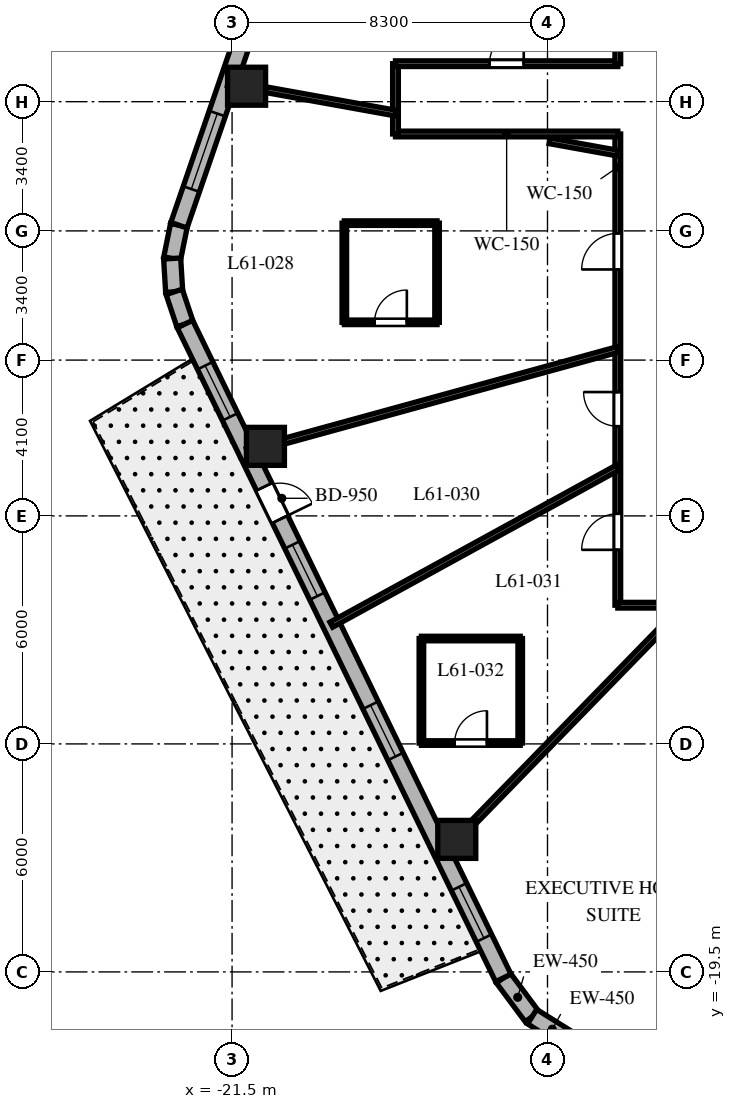
"""IFC4 building model, lengths in metres.
Left out: names, types, materials, properties, quantities, classifications, styles, units other than length and angle.
Written with IfcOpenShell. Run it as: python <this file> out.ifc"""

import sys

from ifc_helpers import new_model, si_unit, direction, frame, frame_2d, origin, origin_2d, place, context, subcontext, project, spatial, rectangle, extrude, element, fill, save


model = new_model("IFC4")
c1 = context("Model", 3, precision=1e-05, world=origin(), true_north=direction((0.0, 1.0)))
c2 = subcontext(c1, "Body", "Model", "MODEL_VIEW")
j1 = project(units=[si_unit("LENGTHUNIT", "METRE"), si_unit("PLANEANGLEUNIT", "RADIAN")], contexts=[c1])
p1 = place(None, origin())
s1 = spatial("IfcSite", under=j1, at=p1, CompositionType="ELEMENT")
p2 = place(p1, origin())
s2 = spatial("IfcBuilding", under=s1, at=p2, CompositionType="ELEMENT")
p3 = place(p2, frame((0.0, 0.0, 244.5)))
s3 = spatial("IfcBuildingStorey", under=s2, at=p3, CompositionType="ELEMENT", Elevation=244.5)
for number, where, z_axis, x_axis in (
    (1, (-21.118, 3.807, 0.0), (0.0, 0.0, 1.0), (1.0, 0.0, 0.0)),
    (2, (-20.622, -5.67, 0.0), (0.0, 0.0, 1.0), (1.0, 0.0, 0.0)),
    (3, (-15.587, -16.013, 0.0), (0.0, 0.0, 1.0), (1.0, 0.0, 0.0)),
):
    element("IfcColumn", number, at=place(p3, frame(where, z_axis=z_axis, x_axis=x_axis)), inside=s3, PredefinedType="COLUMN", context=c2, shape_type="SweptSolid", body=[
        extrude(rectangle(XDim=1.0, YDim=1.0, at=origin_2d()), origin(), (0.0, 0.0, 1.0), 3.8),
    ])
p4 = place(p3, frame((-14.362, -19.658, 0.0), z_axis=(0.0, 0.0, 1.0), x_axis=(0.596642462792, -0.80250717853, 0.0)))
e4 = element("IfcWall", 4, at=p4, inside=s3, PredefinedType="SOLIDWALL", context=c2, shape_type="SweptSolid", body=[
    extrude(rectangle(XDim=1.27, YDim=0.45, at=frame_2d((0.635, 0.0))), origin(), (0.0, 0.0, 1.0), 3.5),
])
p5 = place(p3, frame((-13.604, -20.678, 0.0), z_axis=(0.0, 0.0, 1.0), x_axis=(0.847910404124, -0.53013955387, 0.0)))
e5 = element("IfcWall", 5, at=p5, inside=s3, PredefinedType="SOLIDWALL", context=c2, shape_type="SweptSolid", body=[
    extrude(rectangle(XDim=1.249, YDim=0.45, at=frame_2d((0.624, 0.0))), origin(), (0.0, 0.0, 1.0), 3.5),
])
p6 = place(p3, frame((-22.898, 0.15, 0.0), z_axis=(0.0, 0.0, 1.0), x_axis=(-0.199055826889, -0.979988151858, 0.0)))
e6 = element("IfcWall", 6, at=p6, inside=s3, PredefinedType="SOLIDWALL", context=c2, shape_type="SweptSolid", body=[
    extrude(rectangle(XDim=0.894, YDim=0.45, at=frame_2d((0.447, 0.0))), origin(), (0.0, 0.0, 1.0), 3.5),
])
p7 = place(p3, frame((-23.076, -0.727, 0.0), z_axis=(0.0, 0.0, 1.0), x_axis=(0.060805222108, -0.998149650586, 0.0)))
e7 = element("IfcWall", 7, at=p7, inside=s3, PredefinedType="SOLIDWALL", context=c2, shape_type="SweptSolid", body=[
    extrude(rectangle(XDim=0.879, YDim=0.45, at=frame_2d((0.44, 0.0))), origin(), (0.0, 0.0, 1.0), 3.5),
])
p8 = place(p3, frame((-23.023, -1.604, 0.0), z_axis=(0.0, 0.0, 1.0), x_axis=(0.316801227695, -0.948491951537, 0.0)))
e8 = element("IfcWall", 8, at=p8, inside=s3, PredefinedType="SOLIDWALL", context=c2, shape_type="SweptSolid", body=[
    extrude(rectangle(XDim=0.894, YDim=0.45, at=frame_2d((0.447, 0.0))), origin(), (0.0, 0.0, 1.0), 3.5),
])
p9 = place(p3, frame((-16.324, 19.275, 0.0), z_axis=(0.0, 0.0, 1.0), x_axis=(-0.325083142304, -0.945685439557, 0.0)))
e9 = element("IfcWall", 9, at=p9, inside=s3, PredefinedType="SOLIDWALL", context=c2, shape_type="SweptSolid", body=[
    extrude(rectangle(XDim=20.224, YDim=0.45, at=frame_2d((10.112, 0.0))), origin(), (0.0, 0.0, 1.0), 3.5),
])
p10 = place(p9, frame((0.953, 0.0, 0.8)))
e10 = element("IfcOpeningElement", 10, at=p10, cuts=e9, PredefinedType="OPENING", context=c2, shape_type="SweptSolid", body=[
    extrude(rectangle(XDim=2.1, YDim=1.85, at=frame_2d((1.05, 0.925))), frame((0.0, 0.235, 0.0), z_axis=(0.0, -1.0, 0.0), x_axis=(1.0, 0.0, 0.0)), (0.0, 0.0, 1.0), 0.47),
])
p11 = place(p9, frame((6.268, 0.0, 0.8)))
e11 = element("IfcOpeningElement", 11, at=p11, cuts=e9, PredefinedType="OPENING", context=c2, shape_type="SweptSolid", body=[
    extrude(rectangle(XDim=2.1, YDim=1.85, at=frame_2d((1.05, 0.925))), frame((0.0, 0.235, 0.0), z_axis=(0.0, -1.0, 0.0), x_axis=(1.0, 0.0, 0.0)), (0.0, 0.0, 1.0), 0.47),
])
p12 = place(p9, frame((11.95, 0.0, 0.8)))
e12 = element("IfcOpeningElement", 12, at=p12, cuts=e9, PredefinedType="OPENING", context=c2, shape_type="SweptSolid", body=[
    extrude(rectangle(XDim=2.1, YDim=1.85, at=frame_2d((1.05, 0.925))), frame((0.0, 0.235, 0.0), z_axis=(0.0, -1.0, 0.0), x_axis=(1.0, 0.0, 0.0)), (0.0, 0.0, 1.0), 0.47),
])
p13 = place(p9, frame((17.118, 0.0, 0.8)))
e13 = element("IfcOpeningElement", 13, at=p13, cuts=e9, PredefinedType="OPENING", context=c2, shape_type="SweptSolid", body=[
    extrude(rectangle(XDim=2.1, YDim=1.85, at=frame_2d((1.05, 0.925))), frame((0.0, 0.235, 0.0), z_axis=(0.0, -1.0, 0.0), x_axis=(1.0, 0.0, 0.0)), (0.0, 0.0, 1.0), 0.47),
])
p14 = place(p3, frame((-22.74, -2.452, 0.0), z_axis=(0.0, 0.0, 1.0), x_axis=(0.437753424814, -0.899095066755, 0.0)))
e14 = element("IfcWall", 14, at=p14, inside=s3, PredefinedType="SOLIDWALL", context=c2, shape_type="SweptSolid", body=[
    extrude(rectangle(XDim=19.137, YDim=0.45, at=frame_2d((9.569, 0.0))), origin(), (0.0, 0.0, 1.0), 3.5),
])
p15 = place(p14, frame((4.763, 0.0, 0.0)))
e15 = element("IfcOpeningElement", 15, at=p15, cuts=e14, PredefinedType="OPENING", context=c2, shape_type="SweptSolid", body=[
    extrude(rectangle(XDim=0.95, YDim=2.15, at=frame_2d((0.475, 1.075))), frame((0.0, 0.235, 0.0), z_axis=(0.0, -1.0, 0.0), x_axis=(1.0, 0.0, 0.0)), (0.0, 0.0, 1.0), 0.47),
])
p16 = place(p14, frame((1.216, 0.0, 0.8)))
e16 = element("IfcOpeningElement", 16, at=p16, cuts=e14, PredefinedType="OPENING", context=c2, shape_type="SweptSolid", body=[
    extrude(rectangle(XDim=1.5, YDim=1.8, at=frame_2d((0.75, 0.9))), frame((0.0, 0.235, 0.0), z_axis=(0.0, -1.0, 0.0), x_axis=(1.0, 0.0, 0.0)), (0.0, 0.0, 1.0), 0.47),
])
p17 = place(p14, frame((6.461, 0.0, 0.8)))
e17 = element("IfcOpeningElement", 17, at=p17, cuts=e14, PredefinedType="OPENING", context=c2, shape_type="SweptSolid", body=[
    extrude(rectangle(XDim=1.5, YDim=1.8, at=frame_2d((0.75, 0.9))), frame((0.0, 0.235, 0.0), z_axis=(0.0, -1.0, 0.0), x_axis=(1.0, 0.0, 0.0)), (0.0, 0.0, 1.0), 0.47),
])
p18 = place(p14, frame((11.156, 0.0, 0.8)))
e18 = element("IfcOpeningElement", 18, at=p18, cuts=e14, PredefinedType="OPENING", context=c2, shape_type="SweptSolid", body=[
    extrude(rectangle(XDim=1.5, YDim=1.8, at=frame_2d((0.75, 0.9))), frame((0.0, 0.235, 0.0), z_axis=(0.0, -1.0, 0.0), x_axis=(1.0, 0.0, 0.0)), (0.0, 0.0, 1.0), 0.47),
])
p19 = place(p14, frame((16.473, 0.0, 0.8)))
e19 = element("IfcOpeningElement", 19, at=p19, cuts=e14, PredefinedType="OPENING", context=c2, shape_type="SweptSolid", body=[
    extrude(rectangle(XDim=1.5, YDim=1.8, at=frame_2d((0.75, 0.9))), frame((0.0, 0.235, 0.0), z_axis=(0.0, -1.0, 0.0), x_axis=(1.0, 0.0, 0.0)), (0.0, 0.0, 1.0), 0.47),
])
p20 = place(p3, frame((-11.35, -9.85, 0.0), z_axis=(0.0, 0.0, 1.0), x_axis=(0.0, 1.0, 0.0)))
e20 = element("IfcWall", 20, at=p20, inside=s3, PredefinedType="PARTITIONING", context=c2, shape_type="SweptSolid", body=[
    extrude(rectangle(XDim=12.4, YDim=0.15, at=frame_2d((6.2, 0.0))), origin(), (0.0, 0.0, 1.0), 2.99),
])
p21 = place(p20, frame((8.835, 0.0, 0.0)))
e21 = element("IfcOpeningElement", 21, at=p21, cuts=e20, PredefinedType="OPENING", context=c2, shape_type="SweptSolid", body=[
    extrude(rectangle(XDim=0.95, YDim=2.03, at=frame_2d((0.475, 1.015))), frame((0.0, 0.085, 0.0), z_axis=(0.0, -1.0, 0.0), x_axis=(1.0, 0.0, 0.0)), (0.0, 0.0, 1.0), 0.17),
])
p22 = place(p20, frame((4.709, 0.0, 0.0)))
e22 = element("IfcOpeningElement", 22, at=p22, cuts=e20, PredefinedType="OPENING", context=c2, shape_type="SweptSolid", body=[
    extrude(rectangle(XDim=0.9, YDim=2.03, at=frame_2d((0.45, 1.015))), frame((0.0, 0.085, 0.0), z_axis=(0.0, -1.0, 0.0), x_axis=(1.0, 0.0, 0.0)), (0.0, 0.0, 1.0), 0.17),
])
p23 = place(p20, frame((1.457, 0.0, 0.0)))
e23 = element("IfcOpeningElement", 23, at=p23, cuts=e20, PredefinedType="OPENING", context=c2, shape_type="SweptSolid", body=[
    extrude(rectangle(XDim=0.95, YDim=2.03, at=frame_2d((0.475, 1.015))), frame((0.0, 0.085, 0.0), z_axis=(0.0, -1.0, 0.0), x_axis=(1.0, 0.0, 0.0)), (0.0, 0.0, 1.0), 0.17),
])
p24 = place(p3, frame((-11.35, 2.55, 0.0), z_axis=(0.0, 0.0, 1.0), x_axis=(-1.0, 0.0, 0.0)))
e24 = element("IfcWall", 24, at=p24, inside=s3, PredefinedType="PARTITIONING", context=c2, shape_type="SweptSolid", body=[
    extrude(rectangle(XDim=5.85, YDim=0.15, at=frame_2d((2.925, 0.0))), origin(), (0.0, 0.0, 1.0), 2.94),
])
p25 = place(p3, frame((-17.2, 2.55, 0.0), z_axis=(0.0, 0.0, 1.0), x_axis=(0.0, 1.0, 0.0)))
e25 = element("IfcWall", 25, at=p25, inside=s3, PredefinedType="PARTITIONING", context=c2, shape_type="SweptSolid", body=[
    extrude(rectangle(XDim=1.85, YDim=0.15, at=frame_2d((0.925, 0.0))), origin(), (0.0, 0.0, 1.0), 2.94),
])
p26 = place(p3, frame((-17.2, 4.4, 0.0), z_axis=(0.0, 0.0, 1.0), x_axis=(1.0, 0.0, 0.0)))
e26 = element("IfcWall", 26, at=p26, inside=s3, PredefinedType="PARTITIONING", context=c2, shape_type="SweptSolid", body=[
    extrude(rectangle(XDim=5.85, YDim=0.15, at=frame_2d((2.925, 0.0))), origin(), (0.0, 0.0, 1.0), 2.94),
])
p27 = place(p26, frame((2.475, 0.0, 0.0)))
e27 = element("IfcOpeningElement", 27, at=p27, cuts=e26, PredefinedType="OPENING", context=c2, shape_type="SweptSolid", body=[
    extrude(rectangle(XDim=0.9, YDim=2.03, at=frame_2d((0.45, 1.015))), frame((0.0, 0.085, 0.0), z_axis=(0.0, -1.0, 0.0), x_axis=(1.0, 0.0, 0.0)), (0.0, 0.0, 1.0), 0.17),
])
p28 = place(p3, frame((-11.35, 4.4, 0.0), z_axis=(0.0, 0.0, 1.0), x_axis=(0.0, 1.0, 0.0)))
e28 = element("IfcWall", 28, at=p28, inside=s3, PredefinedType="PARTITIONING", context=c2, shape_type="SweptSolid", body=[
    extrude(rectangle(XDim=5.45, YDim=0.15, at=frame_2d((2.725, 0.0))), origin(), (0.0, 0.0, 1.0), 2.99),
])
p29 = place(p28, frame((2.694, 0.0, 0.0)))
e29 = element("IfcOpeningElement", 29, at=p29, cuts=e28, PredefinedType="OPENING", context=c2, shape_type="SweptSolid", body=[
    extrude(rectangle(XDim=0.95, YDim=2.03, at=frame_2d((0.475, 1.015))), frame((0.0, 0.085, 0.0), z_axis=(0.0, -1.0, 0.0), x_axis=(1.0, 0.0, 0.0)), (0.0, 0.0, 1.0), 0.17),
])
p30 = place(p3, frame((-0.92, -9.85, 0.0), z_axis=(0.0, 0.0, 1.0), x_axis=(-1.0, 0.0, 0.0)))
e30 = element("IfcWall", 30, at=p30, inside=s3, PredefinedType="PARTITIONING", context=c2, shape_type="SweptSolid", body=[
    extrude(rectangle(XDim=10.43, YDim=0.15, at=frame_2d((5.215, 0.0))), origin(), (0.0, 0.0, 1.0), 2.99),
])
p31 = place(p30, frame((4.949, 0.0, 0.0)))
e31 = element("IfcOpeningElement", 31, at=p31, cuts=e30, PredefinedType="OPENING", context=c2, shape_type="SweptSolid", body=[
    extrude(rectangle(XDim=0.95, YDim=2.03, at=frame_2d((0.475, 1.015))), frame((0.0, 0.085, 0.0), z_axis=(0.0, -1.0, 0.0), x_axis=(1.0, 0.0, 0.0)), (0.0, 0.0, 1.0), 0.17),
])
p32 = place(p3, frame((-11.35, 2.046, 0.0), z_axis=(0.0, 0.0, 1.0), x_axis=(-0.984127783205, 0.177461281195, 0.0)))
e32 = element("IfcWall", 32, at=p32, inside=s3, PredefinedType="PARTITIONING", context=c2, shape_type="SweptSolid", body=[
    extrude(rectangle(XDim=1.826, YDim=0.15, at=frame_2d((0.913, 0.0))), origin(), (0.0, 0.0, 1.0), 3.5),
])
p33 = place(p3, frame((-17.2, 3.101, 0.0), z_axis=(0.0, 0.0, 1.0), x_axis=(-0.98413465883, 0.177423147559, 0.0)))
e33 = element("IfcWall", 33, at=p33, inside=s3, PredefinedType="PARTITIONING", context=c2, shape_type="SweptSolid", body=[
    extrude(rectangle(XDim=4.482, YDim=0.15, at=frame_2d((2.241, 0.0))), origin(), (0.0, 0.0, 1.0), 2.74),
])
p34 = place(p3, frame((-11.35, -3.121, 0.0), z_axis=(0.0, 0.0, 1.0), x_axis=(-0.964212793822, -0.265129568758, 0.0)))
e34 = element("IfcWall", 34, at=p34, inside=s3, PredefinedType="PARTITIONING", context=c2, shape_type="SweptSolid", body=[
    extrude(rectangle(XDim=10.12, YDim=0.15, at=frame_2d((5.06, 0.0))), origin(), (0.0, 0.0, 1.0), 2.74),
])
p35 = place(p3, frame((-11.35, -6.227, 0.0), z_axis=(0.0, 0.0, 1.0), x_axis=(-0.876723190824, -0.480995266786, 0.0)))
e35 = element("IfcWall", 35, at=p35, inside=s3, PredefinedType="PARTITIONING", context=c2, shape_type="SweptSolid", body=[
    extrude(rectangle(XDim=8.598, YDim=0.15, at=frame_2d((4.299, 0.0))), origin(), (0.0, 0.0, 1.0), 2.74),
])
p36 = place(p3, frame((-9.588, -9.85, 0.0), z_axis=(0.0, 0.0, 1.0), x_axis=(-0.697519469595, -0.716565830567, 0.0)))
e36 = element("IfcWall", 36, at=p36, inside=s3, PredefinedType="PARTITIONING", context=c2, shape_type="SweptSolid", body=[
    extrude(rectangle(XDim=9.126, YDim=0.15, at=frame_2d((4.563, 0.0))), origin(), (0.0, 0.0, 1.0), 2.74),
])
p37 = place(p3, frame((-18.546, -2.406, 0.0), z_axis=(0.0, 0.0, 1.0), x_axis=(1.0, 0.0, 0.0)))
e37 = element("IfcWall", 37, at=p37, inside=s3, PredefinedType="PARTITIONING", context=c2, shape_type="SweptSolid", body=[
    extrude(rectangle(XDim=2.44, YDim=0.12, at=frame_2d((1.22, 0.0))), origin(), (0.0, 0.0, 1.0), 2.94),
])
p38 = place(p37, frame((0.795, 0.0, 0.0)))
e38 = element("IfcOpeningElement", 38, at=p38, cuts=e37, PredefinedType="OPENING", context=c2, shape_type="SweptSolid", body=[
    extrude(rectangle(XDim=0.85, YDim=2.03, at=frame_2d((0.425, 1.015))), frame((0.0, 0.07, 0.0), z_axis=(0.0, -1.0, 0.0), x_axis=(1.0, 0.0, 0.0)), (0.0, 0.0, 1.0), 0.14),
])
p39 = place(p3, frame((-16.106, -2.406, 0.0), z_axis=(0.0, 0.0, 1.0), x_axis=(0.0, 1.0, 0.0)))
e39 = element("IfcWall", 39, at=p39, inside=s3, PredefinedType="PARTITIONING", context=c2, shape_type="SweptSolid", body=[
    extrude(rectangle(XDim=2.61, YDim=0.12, at=frame_2d((1.305, 0.0))), origin(), (0.0, 0.0, 1.0), 3.5),
])
p40 = place(p3, frame((-16.106, 0.204, 0.0), z_axis=(0.0, 0.0, 1.0), x_axis=(-1.0, 0.0, 0.0)))
e40 = element("IfcWall", 40, at=p40, inside=s3, PredefinedType="PARTITIONING", context=c2, shape_type="SweptSolid", body=[
    extrude(rectangle(XDim=2.44, YDim=0.12, at=frame_2d((1.22, 0.0))), origin(), (0.0, 0.0, 1.0), 2.94),
])
p41 = place(p3, frame((-18.546, 0.204, 0.0), z_axis=(0.0, 0.0, 1.0), x_axis=(0.0, -1.0, 0.0)))
e41 = element("IfcWall", 41, at=p41, inside=s3, PredefinedType="PARTITIONING", context=c2, shape_type="SweptSolid", body=[
    extrude(rectangle(XDim=2.61, YDim=0.12, at=frame_2d((1.305, 0.0))), origin(), (0.0, 0.0, 1.0), 3.5),
])
p42 = place(p3, frame((-16.518, -13.477, 0.0), z_axis=(0.0, 0.0, 1.0), x_axis=(1.0, 0.0, 0.0)))
e42 = element("IfcWall", 42, at=p42, inside=s3, PredefinedType="PARTITIONING", context=c2, shape_type="SweptSolid", body=[
    extrude(rectangle(XDim=2.6, YDim=0.12, at=frame_2d((1.3, 0.0))), origin(), (0.0, 0.0, 1.0), 3.5),
])
p43 = place(p42, frame((0.875, 0.0, 0.0)))
e43 = element("IfcOpeningElement", 43, at=p43, cuts=e42, PredefinedType="OPENING", context=c2, shape_type="SweptSolid", body=[
    extrude(rectangle(XDim=0.85, YDim=2.03, at=frame_2d((0.425, 1.015))), frame((0.0, 0.07, 0.0), z_axis=(0.0, -1.0, 0.0), x_axis=(1.0, 0.0, 0.0)), (0.0, 0.0, 1.0), 0.14),
])
p44 = place(p3, frame((-13.918, -13.477, 0.0), z_axis=(0.0, 0.0, 1.0), x_axis=(0.0, 1.0, 0.0)))
e44 = element("IfcWall", 44, at=p44, inside=s3, PredefinedType="PARTITIONING", context=c2, shape_type="SweptSolid", body=[
    extrude(rectangle(XDim=2.75, YDim=0.12, at=frame_2d((1.375, 0.0))), origin(), (0.0, 0.0, 1.0), 3.027),
])
p45 = place(p3, frame((-13.918, -10.727, 0.0), z_axis=(0.0, 0.0, 1.0), x_axis=(-1.0, 0.0, 0.0)))
e45 = element("IfcWall", 45, at=p45, inside=s3, PredefinedType="PARTITIONING", context=c2, shape_type="SweptSolid", body=[
    extrude(rectangle(XDim=2.6, YDim=0.12, at=frame_2d((1.3, 0.0))), origin(), (0.0, 0.0, 1.0), 3.027),
])
p46 = place(p3, frame((-16.518, -10.727, 0.0), z_axis=(0.0, 0.0, 1.0), x_axis=(0.0, -1.0, 0.0)))
e46 = element("IfcWall", 46, at=p46, inside=s3, PredefinedType="PARTITIONING", context=c2, shape_type="SweptSolid", body=[
    extrude(rectangle(XDim=2.75, YDim=0.12, at=frame_2d((1.375, 0.0))), origin(), (0.0, 0.0, 1.0), 3.5),
])
p47 = place(p13, origin())
e47 = element("IfcWindow", 47, at=p47, inside=s3, PartitioningType="SINGLE_PANEL", PredefinedType="WINDOW", context=c2, shape_type="SweptSolid", body=[
    extrude(rectangle(XDim=2.1, YDim=1.85, at=frame_2d((1.05, 0.925))), frame((0.0, 0.03, 0.0), z_axis=(0.0, -1.0, 0.0), x_axis=(1.0, 0.0, 0.0)), (0.0, 0.0, 1.0), 0.06),
])
fill(e13, e47)
p48 = place(p15, origin())
e48 = element("IfcDoor", 48, at=p48, inside=s3, OperationType="SINGLE_SWING_RIGHT", PredefinedType="DOOR", context=c2, shape_type="SweptSolid", body=[
    extrude(rectangle(XDim=0.95, YDim=2.15, at=frame_2d((0.475, 1.075))), frame((0.0, 0.025, 0.0), z_axis=(0.0, -1.0, 0.0), x_axis=(1.0, 0.0, 0.0)), (0.0, 0.0, 1.0), 0.05),
])
fill(e15, e48)
p49 = place(p16, origin())
e49 = element("IfcWindow", 49, at=p49, inside=s3, PartitioningType="SINGLE_PANEL", PredefinedType="WINDOW", context=c2, shape_type="SweptSolid", body=[
    extrude(rectangle(XDim=1.5, YDim=1.8, at=frame_2d((0.75, 0.9))), frame((0.0, 0.03, 0.0), z_axis=(0.0, -1.0, 0.0), x_axis=(1.0, 0.0, 0.0)), (0.0, 0.0, 1.0), 0.06),
])
fill(e16, e49)
p50 = place(p17, origin())
e50 = element("IfcWindow", 50, at=p50, inside=s3, PartitioningType="SINGLE_PANEL", PredefinedType="WINDOW", context=c2, shape_type="SweptSolid", body=[
    extrude(rectangle(XDim=1.5, YDim=1.8, at=frame_2d((0.75, 0.9))), frame((0.0, 0.03, 0.0), z_axis=(0.0, -1.0, 0.0), x_axis=(1.0, 0.0, 0.0)), (0.0, 0.0, 1.0), 0.06),
])
fill(e17, e50)
p51 = place(p18, origin())
e51 = element("IfcWindow", 51, at=p51, inside=s3, PartitioningType="SINGLE_PANEL", PredefinedType="WINDOW", context=c2, shape_type="SweptSolid", body=[
    extrude(rectangle(XDim=1.5, YDim=1.8, at=frame_2d((0.75, 0.9))), frame((0.0, 0.03, 0.0), z_axis=(0.0, -1.0, 0.0), x_axis=(1.0, 0.0, 0.0)), (0.0, 0.0, 1.0), 0.06),
])
fill(e18, e51)
p52 = place(p19, origin())
e52 = element("IfcWindow", 52, at=p52, inside=s3, PartitioningType="SINGLE_PANEL", PredefinedType="WINDOW", context=c2, shape_type="SweptSolid", body=[
    extrude(rectangle(XDim=1.5, YDim=1.8, at=frame_2d((0.75, 0.9))), frame((0.0, 0.03, 0.0), z_axis=(0.0, -1.0, 0.0), x_axis=(1.0, 0.0, 0.0)), (0.0, 0.0, 1.0), 0.06),
])
fill(e19, e52)
p53 = place(p27, origin())
e53 = element("IfcDoor", 53, at=p53, inside=s3, OperationType="SINGLE_SWING_RIGHT", PredefinedType="DOOR", context=c2, shape_type="SweptSolid", body=[
    extrude(rectangle(XDim=0.9, YDim=2.03, at=frame_2d((0.45, 1.015))), frame((0.0, 0.025, 0.0), z_axis=(0.0, -1.0, 0.0), x_axis=(1.0, 0.0, 0.0)), (0.0, 0.0, 1.0), 0.05),
])
fill(e27, e53)
p54 = place(p21, origin())
e54 = element("IfcDoor", 54, at=p54, inside=s3, OperationType="SINGLE_SWING_LEFT", PredefinedType="DOOR", context=c2, shape_type="SweptSolid", body=[
    extrude(rectangle(XDim=0.95, YDim=2.03, at=frame_2d((0.475, 1.015))), frame((0.0, 0.025, 0.0), z_axis=(0.0, -1.0, 0.0), x_axis=(1.0, 0.0, 0.0)), (0.0, 0.0, 1.0), 0.05),
])
fill(e21, e54)
p55 = place(p38, origin())
e55 = element("IfcDoor", 55, at=p55, inside=s3, OperationType="SINGLE_SWING_RIGHT", PredefinedType="DOOR", context=c2, shape_type="SweptSolid", body=[
    extrude(rectangle(XDim=0.85, YDim=2.03, at=frame_2d((0.425, 1.015))), frame((0.0, 0.025, 0.0), z_axis=(0.0, -1.0, 0.0), x_axis=(1.0, 0.0, 0.0)), (0.0, 0.0, 1.0), 0.05),
])
fill(e38, e55)
p56 = place(p22, origin())
e56 = element("IfcDoor", 56, at=p56, inside=s3, OperationType="SINGLE_SWING_RIGHT", PredefinedType="DOOR", context=c2, shape_type="SweptSolid", body=[
    extrude(rectangle(XDim=0.9, YDim=2.03, at=frame_2d((0.45, 1.015))), frame((0.0, 0.025, 0.0), z_axis=(0.0, -1.0, 0.0), x_axis=(1.0, 0.0, 0.0)), (0.0, 0.0, 1.0), 0.05),
])
fill(e22, e56)
p57 = place(p23, origin())
e57 = element("IfcDoor", 57, at=p57, inside=s3, OperationType="SINGLE_SWING_LEFT", PredefinedType="DOOR", context=c2, shape_type="SweptSolid", body=[
    extrude(rectangle(XDim=0.95, YDim=2.03, at=frame_2d((0.475, 1.015))), frame((0.0, 0.025, 0.0), z_axis=(0.0, -1.0, 0.0), x_axis=(1.0, 0.0, 0.0)), (0.0, 0.0, 1.0), 0.05),
])
fill(e23, e57)
p58 = place(p43, origin())
e58 = element("IfcDoor", 58, at=p58, inside=s3, OperationType="SINGLE_SWING_RIGHT", PredefinedType="DOOR", context=c2, shape_type="SweptSolid", body=[
    extrude(rectangle(XDim=0.85, YDim=2.03, at=frame_2d((0.425, 1.015))), frame((0.0, 0.025, 0.0), z_axis=(0.0, -1.0, 0.0), x_axis=(1.0, 0.0, 0.0)), (0.0, 0.0, 1.0), 0.05),
])
fill(e43, e58)
save(model, sys.argv[1])
